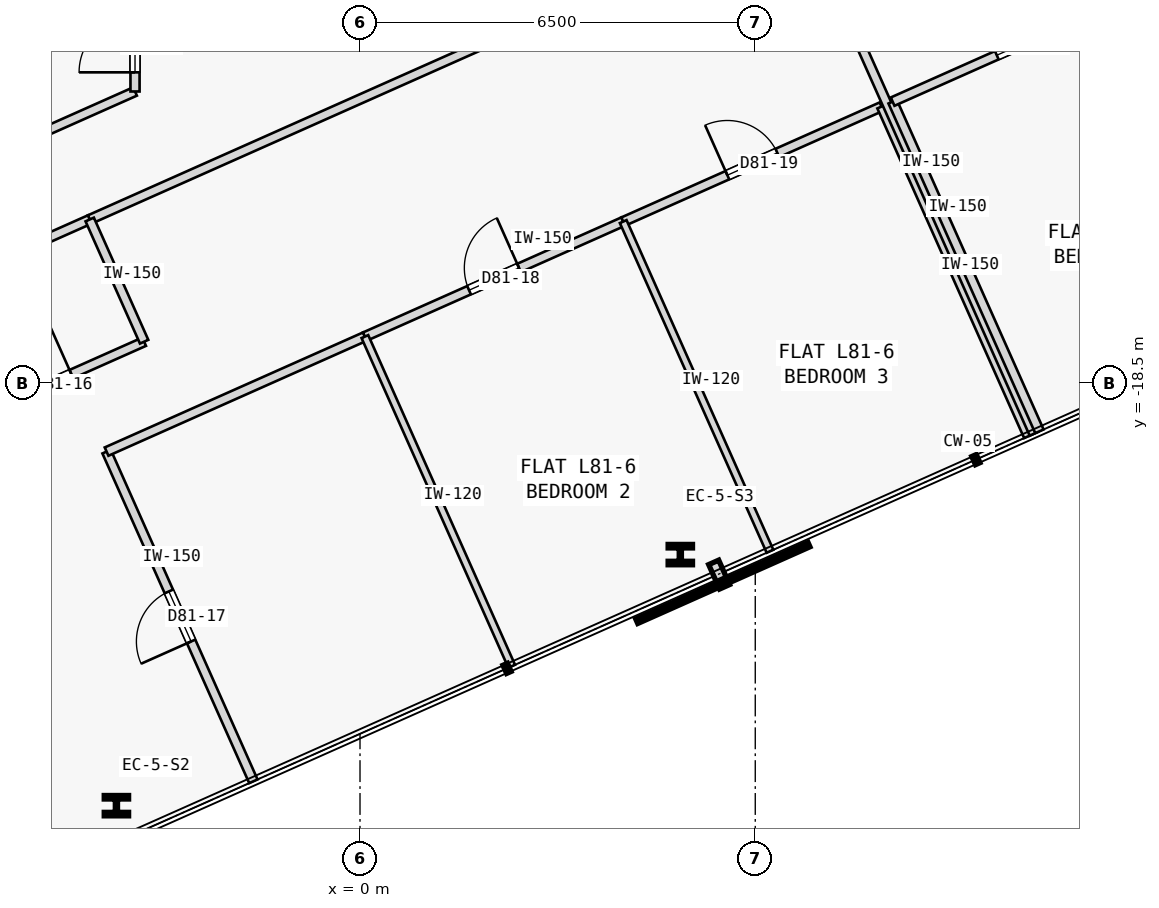
"""IFC4 building model, lengths in metres.
Left out: names, types, materials, properties, quantities, classifications, styles, units other than length and angle.
Written with IfcOpenShell. Run it as: python <this file> out.ifc"""

import sys

from ifc_helpers import new_model, si_unit, direction, frame, frame_2d, origin, origin_2d, place, context, subcontext, project, spatial, rectangle, i_section, extrude, element, fill, save


model = new_model("IFC4")
c1 = context("Model", 3, precision=1e-05, world=origin(), true_north=direction((0.0, 1.0)))
c2 = subcontext(c1, "Body", "Model", "MODEL_VIEW")
j1 = project(units=[si_unit("LENGTHUNIT", "METRE"), si_unit("PLANEANGLEUNIT", "RADIAN")], contexts=[c1])
p1 = place(None, origin())
s1 = spatial("IfcSite", under=j1, at=p1, CompositionType="ELEMENT")
p2 = place(p1, origin())
s2 = spatial("IfcBuilding", under=s1, at=p2, CompositionType="ELEMENT")
p3 = place(p2, frame((0.0, 0.0, 302.0)))
s3 = spatial("IfcBuildingStorey", under=s2, at=p3, CompositionType="ELEMENT", Elevation=302.0)
for number, where, z_axis, x_axis in (
    (1, (-4.006, -25.448, 0.0), (0.0, 0.0, 1.0), (1.0, 0.0, 0.0)),
    (2, (5.268, -21.319, 0.0), (0.0, 0.0, 1.0), (1.0, 0.0, 0.0)),
):
    element("IfcColumn", number, at=place(p3, frame(where, z_axis=z_axis, x_axis=x_axis)), inside=s3, PredefinedType="COLUMN", context=c2, shape_type="SweptSolid", body=[
        extrude(i_section(OverallWidth=0.401, OverallDepth=0.335, WebThickness=0.036, FlangeThickness=0.058, FilletRadius=0.015, at=origin_2d()), origin(), (0.0, 0.0, 1.0), 3.55),
    ])
p4 = place(p3, frame((-4.445, -15.808, 0.0), z_axis=(0.0, 0.0, 1.0), x_axis=(0.913546853922, 0.406733506966, 0.0)))
e3 = element("IfcWall", 3, at=p4, inside=s3, PredefinedType="PARTITIONING", context=c2, shape_type="SweptSolid", body=[
    extrude(rectangle(XDim=12.751, YDim=0.15, at=frame_2d((6.375, 0.0))), origin(), (0.0, 0.0, 1.0), 3.145),
])
p5 = place(p3, frame((-7.643, -17.232, 0.0), z_axis=(0.0, 0.0, 1.0), x_axis=(0.913549606868, 0.406727323635, 0.0)))
e4 = element("IfcWall", 4, at=p5, inside=s3, PredefinedType="PARTITIONING", context=c2, shape_type="SweptSolid", body=[
    extrude(rectangle(XDim=3.5, YDim=0.15, at=frame_2d((1.75, 0.0))), origin(), (0.0, 0.0, 1.0), 3.145),
])
p6 = place(p3, frame((-9.702, -16.375, 0.0), z_axis=(0.0, 0.0, 1.0), x_axis=(0.913552389019, 0.406721074594, 0.0)))
e5 = element("IfcWall", 5, at=p6, inside=s3, PredefinedType="PARTITIONING", context=c2, shape_type="SweptSolid", body=[
    extrude(rectangle(XDim=6.57, YDim=0.15, at=frame_2d((3.285, 0.0))), origin(), (0.0, 0.0, 1.0), 3.145),
])
p7 = place(p3, frame((-3.7, -13.703, 0.0), z_axis=(0.0, 0.0, 1.0), x_axis=(-0.000157529929, 0.999999987592, 0.0)))
e6 = element("IfcWall", 6, at=p7, inside=s3, PredefinedType="PARTITIONING", context=c2, shape_type="SweptSolid", body=[
    extrude(rectangle(XDim=1.55, YDim=0.15, at=frame_2d((0.775, 0.0))), origin(), (0.0, 0.0, 1.0), 3.145),
])
p8 = place(p7, frame((0.315, 0.0, 0.0)))
e7 = element("IfcOpeningElement", 7, at=p8, cuts=e6, PredefinedType="OPENING", context=c2, shape_type="SweptSolid", body=[
    extrude(rectangle(XDim=0.92, YDim=2.04, at=frame_2d((0.46, 1.02))), frame((0.0, 0.085, 0.0), z_axis=(0.0, -1.0, 0.0), x_axis=(1.0, 0.0, 0.0)), (0.0, 0.0, 1.0), 0.17),
])
p9 = place(p3, frame((-6.748, -19.242, 0.0), z_axis=(0.0, 0.0, 1.0), x_axis=(0.913549606868, 0.406727323635, 0.0)))
e8 = element("IfcWall", 8, at=p9, inside=s3, PredefinedType="PARTITIONING", context=c2, shape_type="SweptSolid", body=[
    extrude(rectangle(XDim=3.5, YDim=0.15, at=frame_2d((1.75, 0.0))), origin(), (0.0, 0.0, 1.0), 3.145),
])
p10 = place(p9, frame((1.31, 0.0, 0.0)))
e9 = element("IfcOpeningElement", 9, at=p10, cuts=e8, PredefinedType="OPENING", context=c2, shape_type="SweptSolid", body=[
    extrude(rectangle(XDim=0.88, YDim=2.04, at=frame_2d((0.44, 1.02))), frame((0.0, 0.085, 0.0), z_axis=(0.0, -1.0, 0.0), x_axis=(1.0, 0.0, 0.0)), (0.0, 0.0, 1.0), 0.17),
])
p11 = place(p3, frame((-3.55, -17.818, 0.0), z_axis=(0.0, 0.0, 1.0), x_axis=(-0.406725294076, 0.913550510459, 0.0)))
e10 = element("IfcWall", 10, at=p11, inside=s3, PredefinedType="PARTITIONING", context=c2, shape_type="SweptSolid", body=[
    extrude(rectangle(XDim=2.2, YDim=0.15, at=frame_2d((1.1, 0.0))), origin(), (0.0, 0.0, 1.0), 3.145),
])
p12 = place(p3, frame((-1.754, -25.047, 0.0), z_axis=(0.0, 0.0, 1.0), x_axis=(-0.406714717734, 0.913555219119, 0.0)))
e11 = element("IfcWall", 11, at=p12, inside=s3, PredefinedType="PARTITIONING", context=c2, shape_type="SweptSolid", body=[
    extrude(rectangle(XDim=5.935, YDim=0.15, at=frame_2d((2.967, 0.0))), origin(), (0.0, 0.0, 1.0), 3.145),
])
p13 = place(p12, frame((2.518, 0.0, 0.0)))
e12 = element("IfcOpeningElement", 12, at=p13, cuts=e11, PredefinedType="OPENING", context=c2, shape_type="SweptSolid", body=[
    extrude(rectangle(XDim=0.9, YDim=2.04, at=frame_2d((0.45, 1.02))), frame((0.0, 0.085, 0.0), z_axis=(0.0, -1.0, 0.0), x_axis=(1.0, 0.0, 0.0)), (0.0, 0.0, 1.0), 0.17),
])
p14 = place(p3, frame((-4.167, -19.625, 0.0), z_axis=(0.0, 0.0, 1.0), x_axis=(0.913536363976, 0.406757067172, 0.0)))
e13 = element("IfcWall", 13, at=p14, inside=s3, PredefinedType="PARTITIONING", context=c2, shape_type="SweptSolid", body=[
    extrude(rectangle(XDim=4.65, YDim=0.15, at=frame_2d((2.325, 0.0))), origin(), (0.0, 0.0, 1.0), 3.145),
])
p15 = place(p3, frame((0.08, -17.734, 0.0), z_axis=(0.0, 0.0, 1.0), x_axis=(0.91354505039, 0.40673755778, 0.0)))
e14 = element("IfcWall", 14, at=p15, inside=s3, PredefinedType="PARTITIONING", context=c2, shape_type="SweptSolid", body=[
    extrude(rectangle(XDim=4.65, YDim=0.15, at=frame_2d((2.325, 0.0))), origin(), (0.0, 0.0, 1.0), 3.145),
])
p16 = place(p15, frame((1.875, 0.0, 0.0)))
e15 = element("IfcOpeningElement", 15, at=p16, cuts=e14, PredefinedType="OPENING", context=c2, shape_type="SweptSolid", body=[
    extrude(rectangle(XDim=0.9, YDim=2.04, at=frame_2d((0.45, 1.02))), frame((0.0, 0.085, 0.0), z_axis=(0.0, -1.0, 0.0), x_axis=(1.0, 0.0, 0.0)), (0.0, 0.0, 1.0), 0.17),
])
p17 = place(p3, frame((4.328, -15.843, 0.0), z_axis=(0.0, 0.0, 1.0), x_axis=(0.91354505039, 0.40673755778, 0.0)))
e16 = element("IfcWall", 16, at=p17, inside=s3, PredefinedType="PARTITIONING", context=c2, shape_type="SweptSolid", body=[
    extrude(rectangle(XDim=4.65, YDim=0.15, at=frame_2d((2.325, 0.0))), origin(), (0.0, 0.0, 1.0), 3.145),
])
p18 = place(p17, frame((1.875, 0.0, 0.0)))
e17 = element("IfcOpeningElement", 17, at=p18, cuts=e16, PredefinedType="OPENING", context=c2, shape_type="SweptSolid", body=[
    extrude(rectangle(XDim=0.9, YDim=2.04, at=frame_2d((0.45, 1.02))), frame((0.0, 0.085, 0.0), z_axis=(0.0, -1.0, 0.0), x_axis=(1.0, 0.0, 0.0)), (0.0, 0.0, 1.0), 0.17),
])
p19 = place(p3, frame((10.99, -19.373, 0.0), z_axis=(0.0, 0.0, 1.0), x_axis=(-0.406749048544, 0.913539934271, 0.0)))
e18 = element("IfcWall", 18, at=p19, inside=s3, PredefinedType="PARTITIONING", context=c2, shape_type="SweptSolid", body=[
    extrude(rectangle(XDim=5.935, YDim=0.15, at=frame_2d((2.968, 0.0))), origin(), (0.0, 0.0, 1.0), 3.145),
])
p20 = place(p3, frame((11.082, -19.333, 0.0), z_axis=(0.0, 0.0, 1.0), x_axis=(-0.406729927653, 0.913548447512, 0.0)))
e19 = element("IfcWall", 19, at=p20, inside=s3, PredefinedType="PARTITIONING", context=c2, shape_type="SweptSolid", body=[
    extrude(rectangle(XDim=9.535, YDim=0.15, at=frame_2d((4.768, 0.0))), origin(), (0.0, 0.0, 1.0), 3.145),
])
for number, where, z_axis, x_axis in (
    (20, (2.494, -23.156, 0.0), (0.0, 0.0, 1.0), (-0.407, 0.914, 0.0)),
    (21, (6.742, -21.265, 0.0), (0.0, 0.0, 1.0), (-0.407, 0.914, 0.0)),
):
    element("IfcWall", number, at=place(p3, frame(where, z_axis=z_axis, x_axis=x_axis)), inside=s3, PredefinedType="PARTITIONING", context=c2, shape_type="SweptSolid", body=[
        extrude(rectangle(XDim=5.935, YDim=0.12, at=frame_2d((2.968, 0.0))), origin(), (0.0, 0.0, 1.0), 3.145),
    ])
p21 = place(p3, frame((11.173, -19.292, 0.0), z_axis=(0.0, 0.0, 1.0), x_axis=(-0.406749048544, 0.913539934271, 0.0)))
e22 = element("IfcWall", 22, at=p21, inside=s3, PredefinedType="PARTITIONING", context=c2, shape_type="SweptSolid", body=[
    extrude(rectangle(XDim=5.935, YDim=0.15, at=frame_2d((2.968, 0.0))), origin(), (0.0, 0.0, 1.0), 3.145),
])
p22 = place(p3, frame((8.759, -13.87, 0.0), z_axis=(0.0, 0.0, 1.0), x_axis=(0.91354505039, 0.40673755778, 0.0)))
e23 = element("IfcWall", 23, at=p22, inside=s3, PredefinedType="PARTITIONING", context=c2, shape_type="SweptSolid", body=[
    extrude(rectangle(XDim=4.65, YDim=0.15, at=frame_2d((2.325, 0.0))), origin(), (0.0, 0.0, 1.0), 3.145),
])
p23 = place(p22, frame((1.875, 0.0, 0.0)))
e24 = element("IfcOpeningElement", 24, at=p23, cuts=e23, PredefinedType="OPENING", context=c2, shape_type="SweptSolid", body=[
    extrude(rectangle(XDim=0.9, YDim=2.04, at=frame_2d((0.45, 1.02))), frame((0.0, 0.085, 0.0), z_axis=(0.0, -1.0, 0.0), x_axis=(1.0, 0.0, 0.0)), (0.0, 0.0, 1.0), 0.17),
])
p24 = place(p3, frame((-10.278, -15.082, 0.0), z_axis=(0.0, 0.0, 1.0), x_axis=(0.913549882956, 0.406726703513, 0.0)))
e25 = element("IfcWall", 25, at=p24, inside=s3, PredefinedType="PARTITIONING", context=c2, shape_type="SweptSolid", body=[
    extrude(rectangle(XDim=7.2, YDim=0.15, at=frame_2d((3.6, 0.0))), origin(), (0.0, 0.0, 1.0), 3.145),
])
p25 = place(p3, frame((-11.093, -13.25, 0.0), z_axis=(0.0, 0.0, 1.0), x_axis=(0.913543891457, 0.406740160767, 0.0)))
e26 = element("IfcWall", 26, at=p25, inside=s3, PredefinedType="PARTITIONING", context=c2, shape_type="SweptSolid", body=[
    extrude(rectangle(XDim=8.093, YDim=0.15, at=frame_2d((4.046, 0.0))), origin(), (0.0, 0.0, 1.0), 3.145),
])
p26 = place(p10, origin())
e27 = element("IfcDoor", 27, at=p26, inside=s3, OperationType="SINGLE_SWING_RIGHT", PredefinedType="DOOR", context=c2, shape_type="SweptSolid", body=[
    extrude(rectangle(XDim=0.88, YDim=2.04, at=frame_2d((0.44, 1.02))), frame((0.0, 0.025, 0.0), z_axis=(0.0, -1.0, 0.0), x_axis=(1.0, 0.0, 0.0)), (0.0, 0.0, 1.0), 0.05),
])
fill(e9, e27)
p27 = place(p13, origin())
e28 = element("IfcDoor", 28, at=p27, inside=s3, OperationType="SINGLE_SWING_LEFT", PredefinedType="DOOR", context=c2, shape_type="SweptSolid", body=[
    extrude(rectangle(XDim=0.9, YDim=2.04, at=frame_2d((0.45, 1.02))), frame((0.0, 0.025, 0.0), z_axis=(0.0, -1.0, 0.0), x_axis=(1.0, 0.0, 0.0)), (0.0, 0.0, 1.0), 0.05),
])
fill(e12, e28)
p28 = place(p16, origin())
e29 = element("IfcDoor", 29, at=p28, inside=s3, OperationType="SINGLE_SWING_RIGHT", PredefinedType="DOOR", context=c2, shape_type="SweptSolid", body=[
    extrude(rectangle(XDim=0.9, YDim=2.04, at=frame_2d((0.45, 1.02))), frame((0.0, 0.025, 0.0), z_axis=(0.0, -1.0, 0.0), x_axis=(1.0, 0.0, 0.0)), (0.0, 0.0, 1.0), 0.05),
])
fill(e15, e29)
p29 = place(p18, origin())
e30 = element("IfcDoor", 30, at=p29, inside=s3, OperationType="SINGLE_SWING_LEFT", PredefinedType="DOOR", context=c2, shape_type="SweptSolid", body=[
    extrude(rectangle(XDim=0.9, YDim=2.04, at=frame_2d((0.45, 1.02))), frame((0.0, 0.025, 0.0), z_axis=(0.0, -1.0, 0.0), x_axis=(1.0, 0.0, 0.0)), (0.0, 0.0, 1.0), 0.05),
])
fill(e17, e30)
p30 = place(p23, origin())
e31 = element("IfcDoor", 31, at=p30, inside=s3, OperationType="SINGLE_SWING_RIGHT", PredefinedType="DOOR", context=c2, shape_type="SweptSolid", body=[
    extrude(rectangle(XDim=0.9, YDim=2.04, at=frame_2d((0.45, 1.02))), frame((0.0, 0.025, 0.0), z_axis=(0.0, -1.0, 0.0), x_axis=(1.0, 0.0, 0.0)), (0.0, 0.0, 1.0), 0.05),
])
fill(e24, e31)
p31 = place(p8, origin())
e32 = element("IfcDoor", 32, at=p31, inside=s3, OperationType="SINGLE_SWING_LEFT", PredefinedType="DOOR", context=c2, shape_type="SweptSolid", body=[
    extrude(rectangle(XDim=0.92, YDim=2.04, at=frame_2d((0.46, 1.02))), frame((0.0, 0.025, 0.0), z_axis=(0.0, -1.0, 0.0), x_axis=(1.0, 0.0, 0.0)), (0.0, 0.0, 1.0), 0.05),
])
fill(e7, e32)
save(model, sys.argv[1])
